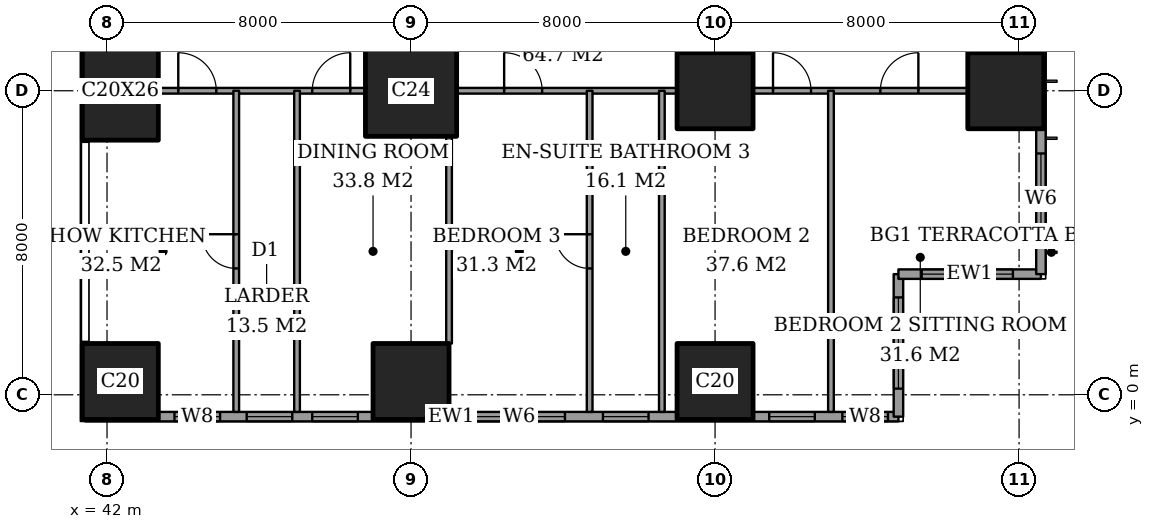
"""IFC4 building model, lengths in metres.
Left out: names, types, materials, properties, quantities, classifications, styles, units other than length and angle.
Written with IfcOpenShell. Run it as: python <this file> out.ifc"""

import sys

from ifc_helpers import new_model, si_unit, direction, frame, frame_2d, origin, origin_2d, place, context, subcontext, project, spatial, rectangle, extrude, element, fill, save


model = new_model("IFC4")
c1 = context("Model", 3, precision=1e-05, world=origin(), true_north=direction((0.0, 1.0)))
c2 = subcontext(c1, "Body", "Model", "MODEL_VIEW")
j1 = project(units=[si_unit("LENGTHUNIT", "METRE"), si_unit("PLANEANGLEUNIT", "RADIAN")], contexts=[c1])
p1 = place(None, origin())
s1 = spatial("IfcSite", under=j1, at=p1, CompositionType="ELEMENT")
p2 = place(p1, origin())
s2 = spatial("IfcBuilding", under=s1, at=p2, CompositionType="ELEMENT")
p3 = place(p2, frame((0.0, 0.0, 87.2)))
s3 = spatial("IfcBuildingStorey", under=s2, at=p3, CompositionType="ELEMENT", Elevation=87.2)
p4 = place(p3, frame((42.35, 0.35, 0.0), z_axis=(0.0, 0.0, 1.0), x_axis=(1.0, 0.0, 0.0)))
e1 = element("IfcColumn", 1, at=p4, inside=s3, PredefinedType="COLUMN", context=c2, shape_type="SweptSolid", body=[
    extrude(rectangle(XDim=2.0, YDim=2.0, at=origin_2d()), origin(), (0.0, 0.0, 1.0), 3.6),
])
p5 = place(p3, frame((42.35, 8.0, 0.0), z_axis=(0.0, 0.0, 1.0), x_axis=(1.0, 0.0, 0.0)))
e2 = element("IfcColumn", 2, at=p5, inside=s3, PredefinedType="COLUMN", context=c2, shape_type="SweptSolid", body=[
    extrude(rectangle(XDim=2.0, YDim=2.6, at=origin_2d()), origin(), (0.0, 0.0, 1.0), 3.6),
])
p6 = place(p3, frame((50.0, 0.35, 0.0), z_axis=(0.0, 0.0, 1.0), x_axis=(1.0, 0.0, 0.0)))
e3 = element("IfcColumn", 3, at=p6, inside=s3, PredefinedType="COLUMN", context=c2, shape_type="SweptSolid", body=[
    extrude(rectangle(XDim=2.0, YDim=2.0, at=origin_2d()), origin(), (0.0, 0.0, 1.0), 3.6),
])
p7 = place(p3, frame((50.0, 8.0, 0.0), z_axis=(0.0, 0.0, 1.0), x_axis=(1.0, 0.0, 0.0)))
e4 = element("IfcColumn", 4, at=p7, inside=s3, PredefinedType="COLUMN", context=c2, shape_type="SweptSolid", body=[
    extrude(rectangle(XDim=2.4, YDim=2.4, at=origin_2d()), origin(), (0.0, 0.0, 1.0), 3.6),
])
for number, where, z_axis, x_axis in (
    (5, (58.0, 0.35, 0.0), (0.0, 0.0, 1.0), (1.0, 0.0, 0.0)),
    (6, (58.0, 8.0, 0.0), (0.0, 0.0, 1.0), (1.0, 0.0, 0.0)),
    (7, (65.65, 8.0, 0.0), (0.0, 0.0, 1.0), (1.0, 0.0, 0.0)),
):
    element("IfcColumn", number, at=place(p3, frame(where, z_axis=z_axis, x_axis=x_axis)), inside=s3, PredefinedType="COLUMN", context=c2, shape_type="SweptSolid", body=[
        extrude(rectangle(XDim=2.0, YDim=2.0, at=origin_2d()), origin(), (0.0, 0.0, 1.0), 3.6),
    ])
p8 = place(p3, frame((41.425, -0.575, 0.0), z_axis=(0.0, 0.0, 1.0), x_axis=(1.0, 0.0, 0.0)))
e8 = element("IfcWall", 8, at=p8, inside=s3, PredefinedType="SOLIDWALL", context=c2, shape_type="SweptSolid", body=[
    extrude(rectangle(XDim=21.4, YDim=0.25, at=frame_2d((10.7, 0.0))), origin(), (0.0, 0.0, 1.0), 3.6),
])
p9 = place(p8, frame((2.35, 0.0, 0.6)))
e9 = element("IfcOpeningElement", 9, at=p9, cuts=e8, PredefinedType="OPENING", context=c2, shape_type="SweptSolid", body=[
    extrude(rectangle(XDim=1.2, YDim=2.0, at=frame_2d((0.6, 1.0))), frame((0.0, 0.135, 0.0), z_axis=(0.0, -1.0, 0.0), x_axis=(1.0, 0.0, 0.0)), (0.0, 0.0, 1.0), 0.27),
])
p10 = place(p8, frame((4.25, 0.0, 0.6)))
e10 = element("IfcOpeningElement", 10, at=p10, cuts=e8, PredefinedType="OPENING", context=c2, shape_type="SweptSolid", body=[
    extrude(rectangle(XDim=1.2, YDim=2.0, at=frame_2d((0.6, 1.0))), frame((0.0, 0.135, 0.0), z_axis=(0.0, -1.0, 0.0), x_axis=(1.0, 0.0, 0.0)), (0.0, 0.0, 1.0), 0.27),
])
p11 = place(p8, frame((5.975, 0.0, 0.6)))
e11 = element("IfcOpeningElement", 11, at=p11, cuts=e8, PredefinedType="OPENING", context=c2, shape_type="SweptSolid", body=[
    extrude(rectangle(XDim=1.2, YDim=2.0, at=frame_2d((0.6, 1.0))), frame((0.0, 0.135, 0.0), z_axis=(0.0, -1.0, 0.0), x_axis=(1.0, 0.0, 0.0)), (0.0, 0.0, 1.0), 0.27),
])
p12 = place(p8, frame((10.225, 0.0, 0.6)))
e12 = element("IfcOpeningElement", 12, at=p12, cuts=e8, PredefinedType="OPENING", context=c2, shape_type="SweptSolid", body=[
    extrude(rectangle(XDim=2.4, YDim=2.0, at=frame_2d((1.2, 1.0))), frame((0.0, 0.135, 0.0), z_axis=(0.0, -1.0, 0.0), x_axis=(1.0, 0.0, 0.0)), (0.0, 0.0, 1.0), 0.27),
])
p13 = place(p8, frame((13.625, 0.0, 0.6)))
e13 = element("IfcOpeningElement", 13, at=p13, cuts=e8, PredefinedType="OPENING", context=c2, shape_type="SweptSolid", body=[
    extrude(rectangle(XDim=1.2, YDim=2.0, at=frame_2d((0.6, 1.0))), frame((0.0, 0.135, 0.0), z_axis=(0.0, -1.0, 0.0), x_axis=(1.0, 0.0, 0.0)), (0.0, 0.0, 1.0), 0.27),
])
p14 = place(p8, frame((18.0, 0.0, 0.6)))
e14 = element("IfcOpeningElement", 14, at=p14, cuts=e8, PredefinedType="OPENING", context=c2, shape_type="SweptSolid", body=[
    extrude(rectangle(XDim=1.2, YDim=2.0, at=frame_2d((0.6, 1.0))), frame((0.0, 0.135, 0.0), z_axis=(0.0, -1.0, 0.0), x_axis=(1.0, 0.0, 0.0)), (0.0, 0.0, 1.0), 0.27),
])
p15 = place(p8, frame((19.925, 0.0, 0.6)))
e15 = element("IfcOpeningElement", 15, at=p15, cuts=e8, PredefinedType="OPENING", context=c2, shape_type="SweptSolid", body=[
    extrude(rectangle(XDim=1.2, YDim=2.0, at=frame_2d((0.6, 1.0))), frame((0.0, 0.135, 0.0), z_axis=(0.0, -1.0, 0.0), x_axis=(1.0, 0.0, 0.0)), (0.0, 0.0, 1.0), 0.27),
])
p16 = place(p3, frame((62.825, -0.575, 0.0), z_axis=(0.0, 0.0, 1.0), x_axis=(0.0, 1.0, 0.0)))
e16 = element("IfcWall", 16, at=p16, inside=s3, PredefinedType="SOLIDWALL", context=c2, shape_type="SweptSolid", body=[
    extrude(rectangle(XDim=3.75, YDim=0.25, at=frame_2d((1.875, 0.0))), origin(), (0.0, 0.0, 1.0), 3.6),
])
p17 = place(p16, frame((0.738, 0.0, 0.6)))
e17 = element("IfcOpeningElement", 17, at=p17, cuts=e16, PredefinedType="OPENING", context=c2, shape_type="SweptSolid", body=[
    extrude(rectangle(XDim=2.4, YDim=2.0, at=frame_2d((1.2, 1.0))), frame((0.0, 0.135, 0.0), z_axis=(0.0, -1.0, 0.0), x_axis=(1.0, 0.0, 0.0)), (0.0, 0.0, 1.0), 0.27),
])
p18 = place(p3, frame((62.825, 3.175, 0.0), z_axis=(0.0, 0.0, 1.0), x_axis=(1.0, 0.0, 0.0)))
e18 = element("IfcWall", 18, at=p18, inside=s3, PredefinedType="SOLIDWALL", context=c2, shape_type="SweptSolid", body=[
    extrude(rectangle(XDim=3.75, YDim=0.25, at=frame_2d((1.875, 0.0))), origin(), (0.0, 0.0, 1.0), 3.6),
])
p19 = place(p18, frame((0.613, 0.0, 0.6)))
e19 = element("IfcOpeningElement", 19, at=p19, cuts=e18, PredefinedType="OPENING", context=c2, shape_type="SweptSolid", body=[
    extrude(rectangle(XDim=2.4, YDim=2.0, at=frame_2d((1.2, 1.0))), frame((0.0, 0.135, 0.0), z_axis=(0.0, -1.0, 0.0), x_axis=(1.0, 0.0, 0.0)), (0.0, 0.0, 1.0), 0.27),
])
p20 = place(p3, frame((66.575, 3.175, 0.0), z_axis=(0.0, 0.0, 1.0), x_axis=(0.0, 1.0, 0.0)))
e20 = element("IfcWall", 20, at=p20, inside=s3, PredefinedType="SOLIDWALL", context=c2, shape_type="SweptSolid", body=[
    extrude(rectangle(XDim=41.65, YDim=0.25, at=frame_2d((20.825, 0.0))), origin(), (0.0, 0.0, 1.0), 3.6),
])
p21 = place(p20, frame((0.775, 0.0, 0.6)))
e21 = element("IfcOpeningElement", 21, at=p21, cuts=e20, PredefinedType="OPENING", context=c2, shape_type="SweptSolid", body=[
    extrude(rectangle(XDim=2.4, YDim=2.0, at=frame_2d((1.2, 1.0))), frame((0.0, 0.135, 0.0), z_axis=(0.0, -1.0, 0.0), x_axis=(1.0, 0.0, 0.0)), (0.0, 0.0, 1.0), 0.27),
])
p22 = place(p20, frame((6.1, 0.0, 0.6)))
e22 = element("IfcOpeningElement", 22, at=p22, cuts=e20, PredefinedType="OPENING", context=c2, shape_type="SweptSolid", body=[
    extrude(rectangle(XDim=1.2, YDim=2.0, at=frame_2d((0.6, 1.0))), frame((0.0, 0.135, 0.0), z_axis=(0.0, -1.0, 0.0), x_axis=(1.0, 0.0, 0.0)), (0.0, 0.0, 1.0), 0.27),
])
p23 = place(p20, frame((8.275, 0.0, 0.6)))
e23 = element("IfcOpeningElement", 23, at=p23, cuts=e20, PredefinedType="OPENING", context=c2, shape_type="SweptSolid", body=[
    extrude(rectangle(XDim=2.4, YDim=2.0, at=frame_2d((1.2, 1.0))), frame((0.0, 0.135, 0.0), z_axis=(0.0, -1.0, 0.0), x_axis=(1.0, 0.0, 0.0)), (0.0, 0.0, 1.0), 0.27),
])
p24 = place(p20, frame((15.775, 0.0, 0.6)))
e24 = element("IfcOpeningElement", 24, at=p24, cuts=e20, PredefinedType="OPENING", context=c2, shape_type="SweptSolid", body=[
    extrude(rectangle(XDim=2.4, YDim=2.0, at=frame_2d((1.2, 1.0))), frame((0.0, 0.135, 0.0), z_axis=(0.0, -1.0, 0.0), x_axis=(1.0, 0.0, 0.0)), (0.0, 0.0, 1.0), 0.27),
])
p25 = place(p20, frame((23.475, 0.0, 0.6)))
e25 = element("IfcOpeningElement", 25, at=p25, cuts=e20, PredefinedType="OPENING", context=c2, shape_type="SweptSolid", body=[
    extrude(rectangle(XDim=2.4, YDim=2.0, at=frame_2d((1.2, 1.0))), frame((0.0, 0.135, 0.0), z_axis=(0.0, -1.0, 0.0), x_axis=(1.0, 0.0, 0.0)), (0.0, 0.0, 1.0), 0.27),
])
p26 = place(p20, frame((30.975, 0.0, 0.6)))
e26 = element("IfcOpeningElement", 26, at=p26, cuts=e20, PredefinedType="OPENING", context=c2, shape_type="SweptSolid", body=[
    extrude(rectangle(XDim=2.4, YDim=2.0, at=frame_2d((1.2, 1.0))), frame((0.0, 0.135, 0.0), z_axis=(0.0, -1.0, 0.0), x_axis=(1.0, 0.0, 0.0)), (0.0, 0.0, 1.0), 0.27),
])
p27 = place(p20, frame((34.5, 0.0, 0.6)))
e27 = element("IfcOpeningElement", 27, at=p27, cuts=e20, PredefinedType="OPENING", context=c2, shape_type="SweptSolid", body=[
    extrude(rectangle(XDim=1.2, YDim=2.0, at=frame_2d((0.6, 1.0))), frame((0.0, 0.135, 0.0), z_axis=(0.0, -1.0, 0.0), x_axis=(1.0, 0.0, 0.0)), (0.0, 0.0, 1.0), 0.27),
])
p28 = place(p20, frame((38.475, 0.0, 0.6)))
e28 = element("IfcOpeningElement", 28, at=p28, cuts=e20, PredefinedType="OPENING", context=c2, shape_type="SweptSolid", body=[
    extrude(rectangle(XDim=2.4, YDim=2.0, at=frame_2d((1.2, 1.0))), frame((0.0, 0.135, 0.0), z_axis=(0.0, -1.0, 0.0), x_axis=(1.0, 0.0, 0.0)), (0.0, 0.0, 1.0), 0.27),
])
p29 = place(p3, frame((43.35, 8.0, 0.0), z_axis=(0.0, 0.0, 1.0), x_axis=(1.0, 0.0, 0.0)))
e29 = element("IfcWall", 29, at=p29, inside=s3, PredefinedType="PARTITIONING", context=c2, shape_type="SweptSolid", body=[
    extrude(rectangle(XDim=5.45, YDim=0.15, at=frame_2d((2.725, 0.0))), origin(), (0.0, 0.0, 1.0), 3.25),
])
p30 = place(p29, frame((4.05, 0.0, 0.0)))
e30 = element("IfcOpeningElement", 30, at=p30, cuts=e29, PredefinedType="OPENING", context=c2, shape_type="SweptSolid", body=[
    extrude(rectangle(XDim=1.0, YDim=2.1, at=frame_2d((0.5, 1.05))), frame((0.0, 0.085, 0.0), z_axis=(0.0, -1.0, 0.0), x_axis=(1.0, 0.0, 0.0)), (0.0, 0.0, 1.0), 0.17),
])
p31 = place(p29, frame((0.525, 0.0, 0.0)))
e31 = element("IfcOpeningElement", 31, at=p31, cuts=e29, PredefinedType="OPENING", context=c2, shape_type="SweptSolid", body=[
    extrude(rectangle(XDim=1.0, YDim=2.1, at=frame_2d((0.5, 1.05))), frame((0.0, 0.085, 0.0), z_axis=(0.0, -1.0, 0.0), x_axis=(1.0, 0.0, 0.0)), (0.0, 0.0, 1.0), 0.17),
])
p32 = place(p3, frame((51.2, 8.0, 0.0), z_axis=(0.0, 0.0, 1.0), x_axis=(1.0, 0.0, 0.0)))
e32 = element("IfcWall", 32, at=p32, inside=s3, PredefinedType="PARTITIONING", context=c2, shape_type="SweptSolid", body=[
    extrude(rectangle(XDim=5.8, YDim=0.15, at=frame_2d((2.9, 0.0))), origin(), (0.0, 0.0, 1.0), 3.25),
])
p33 = place(p32, frame((1.25, 0.0, 0.0)))
e33 = element("IfcOpeningElement", 33, at=p33, cuts=e32, PredefinedType="OPENING", context=c2, shape_type="SweptSolid", body=[
    extrude(rectangle(XDim=1.0, YDim=2.1, at=frame_2d((0.5, 1.05))), frame((0.0, 0.085, 0.0), z_axis=(0.0, -1.0, 0.0), x_axis=(1.0, 0.0, 0.0)), (0.0, 0.0, 1.0), 0.17),
])
p34 = place(p3, frame((59.0, 8.0, 0.0), z_axis=(0.0, 0.0, 1.0), x_axis=(1.0, 0.0, 0.0)))
e34 = element("IfcWall", 34, at=p34, inside=s3, PredefinedType="PARTITIONING", context=c2, shape_type="SweptSolid", body=[
    extrude(rectangle(XDim=5.65, YDim=0.15, at=frame_2d((2.825, 0.0))), origin(), (0.0, 0.0, 1.0), 3.25),
])
p35 = place(p34, frame((3.35, 0.0, 0.0)))
e35 = element("IfcOpeningElement", 35, at=p35, cuts=e34, PredefinedType="OPENING", context=c2, shape_type="SweptSolid", body=[
    extrude(rectangle(XDim=1.0, YDim=2.1, at=frame_2d((0.5, 1.05))), frame((0.0, 0.085, 0.0), z_axis=(0.0, -1.0, 0.0), x_axis=(1.0, 0.0, 0.0)), (0.0, 0.0, 1.0), 0.17),
])
p36 = place(p34, frame((0.525, 0.0, 0.0)))
e36 = element("IfcOpeningElement", 36, at=p36, cuts=e34, PredefinedType="OPENING", context=c2, shape_type="SweptSolid", body=[
    extrude(rectangle(XDim=1.0, YDim=2.1, at=frame_2d((0.5, 1.05))), frame((0.0, 0.085, 0.0), z_axis=(0.0, -1.0, 0.0), x_axis=(1.0, 0.0, 0.0)), (0.0, 0.0, 1.0), 0.17),
])
p37 = place(p3, frame((45.4, -0.45, 0.0), z_axis=(0.0, 0.0, 1.0), x_axis=(0.0, 1.0, 0.0)))
e37 = element("IfcWall", 37, at=p37, inside=s3, PredefinedType="PARTITIONING", context=c2, shape_type="SweptSolid", body=[
    extrude(rectangle(XDim=8.45, YDim=0.15, at=frame_2d((4.225, 0.0))), origin(), (0.0, 0.0, 1.0), 3.25),
])
p38 = place(p37, frame((3.775, 0.0, 0.0)))
e38 = element("IfcOpeningElement", 38, at=p38, cuts=e37, PredefinedType="OPENING", context=c2, shape_type="SweptSolid", body=[
    extrude(rectangle(XDim=0.9, YDim=2.1, at=frame_2d((0.45, 1.05))), frame((0.0, 0.085, 0.0), z_axis=(0.0, -1.0, 0.0), x_axis=(1.0, 0.0, 0.0)), (0.0, 0.0, 1.0), 0.17),
])
p39 = place(p3, frame((47.0, -0.45, 0.0), z_axis=(0.0, 0.0, 1.0), x_axis=(0.0, 1.0, 0.0)))
e39 = element("IfcWall", 39, at=p39, inside=s3, PredefinedType="PARTITIONING", context=c2, shape_type="SweptSolid", body=[
    extrude(rectangle(XDim=8.45, YDim=0.15, at=frame_2d((4.225, 0.0))), origin(), (0.0, 0.0, 1.0), 3.25),
])
p40 = place(p3, frame((51.0, 1.35, 0.0), z_axis=(0.0, 0.0, 1.0), x_axis=(0.0, 1.0, 0.0)))
e40 = element("IfcWall", 40, at=p40, inside=s3, PredefinedType="PARTITIONING", context=c2, shape_type="SweptSolid", body=[
    extrude(rectangle(XDim=5.45, YDim=0.15, at=frame_2d((2.725, 0.0))), origin(), (0.0, 0.0, 1.0), 3.25),
])
p41 = place(p3, frame((54.7, -0.45, 0.0), z_axis=(0.0, 0.0, 1.0), x_axis=(0.0, 1.0, 0.0)))
e41 = element("IfcWall", 41, at=p41, inside=s3, PredefinedType="PARTITIONING", context=c2, shape_type="SweptSolid", body=[
    extrude(rectangle(XDim=8.45, YDim=0.15, at=frame_2d((4.225, 0.0))), origin(), (0.0, 0.0, 1.0), 3.25),
])
p42 = place(p41, frame((3.775, 0.0, 0.0)))
e42 = element("IfcOpeningElement", 42, at=p42, cuts=e41, PredefinedType="OPENING", context=c2, shape_type="SweptSolid", body=[
    extrude(rectangle(XDim=0.9, YDim=2.1, at=frame_2d((0.45, 1.05))), frame((0.0, 0.085, 0.0), z_axis=(0.0, -1.0, 0.0), x_axis=(1.0, 0.0, 0.0)), (0.0, 0.0, 1.0), 0.17),
])
for number, where, z_axis, x_axis in (
    (43, (56.6, -0.45, 0.0), (0.0, 0.0, 1.0), (0.0, 1.0, 0.0)),
    (44, (61.05, -0.45, 0.0), (0.0, 0.0, 1.0), (0.0, 1.0, 0.0)),
):
    element("IfcWall", number, at=place(p3, frame(where, z_axis=z_axis, x_axis=x_axis)), inside=s3, PredefinedType="PARTITIONING", context=c2, shape_type="SweptSolid", body=[
        extrude(rectangle(XDim=8.45, YDim=0.15, at=frame_2d((4.225, 0.0))), origin(), (0.0, 0.0, 1.0), 3.25),
    ])
p43 = place(p9, origin())
e45 = element("IfcWindow", 45, at=p43, inside=s3, PartitioningType="SINGLE_PANEL", PredefinedType="WINDOW", context=c2, shape_type="SweptSolid", body=[
    extrude(rectangle(XDim=1.2, YDim=2.0, at=frame_2d((0.6, 1.0))), frame((0.0, 0.03, 0.0), z_axis=(0.0, -1.0, 0.0), x_axis=(1.0, 0.0, 0.0)), (0.0, 0.0, 1.0), 0.06),
])
fill(e9, e45)
p44 = place(p10, origin())
e46 = element("IfcWindow", 46, at=p44, inside=s3, PartitioningType="SINGLE_PANEL", PredefinedType="WINDOW", context=c2, shape_type="SweptSolid", body=[
    extrude(rectangle(XDim=1.2, YDim=2.0, at=frame_2d((0.6, 1.0))), frame((0.0, 0.03, 0.0), z_axis=(0.0, -1.0, 0.0), x_axis=(1.0, 0.0, 0.0)), (0.0, 0.0, 1.0), 0.06),
])
fill(e10, e46)
p45 = place(p11, origin())
e47 = element("IfcWindow", 47, at=p45, inside=s3, PartitioningType="SINGLE_PANEL", PredefinedType="WINDOW", context=c2, shape_type="SweptSolid", body=[
    extrude(rectangle(XDim=1.2, YDim=2.0, at=frame_2d((0.6, 1.0))), frame((0.0, 0.03, 0.0), z_axis=(0.0, -1.0, 0.0), x_axis=(1.0, 0.0, 0.0)), (0.0, 0.0, 1.0), 0.06),
])
fill(e11, e47)
p46 = place(p12, origin())
e48 = element("IfcWindow", 48, at=p46, inside=s3, PartitioningType="SINGLE_PANEL", PredefinedType="WINDOW", context=c2, shape_type="SweptSolid", body=[
    extrude(rectangle(XDim=2.4, YDim=2.0, at=frame_2d((1.2, 1.0))), frame((0.0, 0.03, 0.0), z_axis=(0.0, -1.0, 0.0), x_axis=(1.0, 0.0, 0.0)), (0.0, 0.0, 1.0), 0.06),
])
fill(e12, e48)
p47 = place(p13, origin())
e49 = element("IfcWindow", 49, at=p47, inside=s3, PartitioningType="SINGLE_PANEL", PredefinedType="WINDOW", context=c2, shape_type="SweptSolid", body=[
    extrude(rectangle(XDim=1.2, YDim=2.0, at=frame_2d((0.6, 1.0))), frame((0.0, 0.03, 0.0), z_axis=(0.0, -1.0, 0.0), x_axis=(1.0, 0.0, 0.0)), (0.0, 0.0, 1.0), 0.06),
])
fill(e13, e49)
p48 = place(p14, origin())
e50 = element("IfcWindow", 50, at=p48, inside=s3, PartitioningType="SINGLE_PANEL", PredefinedType="WINDOW", context=c2, shape_type="SweptSolid", body=[
    extrude(rectangle(XDim=1.2, YDim=2.0, at=frame_2d((0.6, 1.0))), frame((0.0, 0.03, 0.0), z_axis=(0.0, -1.0, 0.0), x_axis=(1.0, 0.0, 0.0)), (0.0, 0.0, 1.0), 0.06),
])
fill(e14, e50)
p49 = place(p15, origin())
e51 = element("IfcWindow", 51, at=p49, inside=s3, PartitioningType="SINGLE_PANEL", PredefinedType="WINDOW", context=c2, shape_type="SweptSolid", body=[
    extrude(rectangle(XDim=1.2, YDim=2.0, at=frame_2d((0.6, 1.0))), frame((0.0, 0.03, 0.0), z_axis=(0.0, -1.0, 0.0), x_axis=(1.0, 0.0, 0.0)), (0.0, 0.0, 1.0), 0.06),
])
fill(e15, e51)
p50 = place(p17, origin())
e52 = element("IfcWindow", 52, at=p50, inside=s3, PartitioningType="SINGLE_PANEL", PredefinedType="WINDOW", context=c2, shape_type="SweptSolid", body=[
    extrude(rectangle(XDim=2.4, YDim=2.0, at=frame_2d((1.2, 1.0))), frame((0.0, 0.03, 0.0), z_axis=(0.0, -1.0, 0.0), x_axis=(1.0, 0.0, 0.0)), (0.0, 0.0, 1.0), 0.06),
])
fill(e17, e52)
p51 = place(p19, origin())
e53 = element("IfcWindow", 53, at=p51, inside=s3, PartitioningType="SINGLE_PANEL", PredefinedType="WINDOW", context=c2, shape_type="SweptSolid", body=[
    extrude(rectangle(XDim=2.4, YDim=2.0, at=frame_2d((1.2, 1.0))), frame((0.0, 0.03, 0.0), z_axis=(0.0, -1.0, 0.0), x_axis=(1.0, 0.0, 0.0)), (0.0, 0.0, 1.0), 0.06),
])
fill(e19, e53)
p52 = place(p21, origin())
e54 = element("IfcWindow", 54, at=p52, inside=s3, PartitioningType="SINGLE_PANEL", PredefinedType="WINDOW", context=c2, shape_type="SweptSolid", body=[
    extrude(rectangle(XDim=2.4, YDim=2.0, at=frame_2d((1.2, 1.0))), frame((0.0, 0.03, 0.0), z_axis=(0.0, -1.0, 0.0), x_axis=(1.0, 0.0, 0.0)), (0.0, 0.0, 1.0), 0.06),
])
fill(e21, e54)
p53 = place(p35, origin())
e55 = element("IfcDoor", 55, at=p53, inside=s3, OperationType="SINGLE_SWING_LEFT", PredefinedType="DOOR", context=c2, shape_type="SweptSolid", body=[
    extrude(rectangle(XDim=1.0, YDim=2.1, at=frame_2d((0.5, 1.05))), frame((0.0, 0.025, 0.0), z_axis=(0.0, -1.0, 0.0), x_axis=(1.0, 0.0, 0.0)), (0.0, 0.0, 1.0), 0.05),
])
fill(e35, e55)
p54 = place(p36, origin())
e56 = element("IfcDoor", 56, at=p54, inside=s3, OperationType="SINGLE_SWING_RIGHT", PredefinedType="DOOR", context=c2, shape_type="SweptSolid", body=[
    extrude(rectangle(XDim=1.0, YDim=2.1, at=frame_2d((0.5, 1.05))), frame((0.0, 0.025, 0.0), z_axis=(0.0, -1.0, 0.0), x_axis=(1.0, 0.0, 0.0)), (0.0, 0.0, 1.0), 0.05),
])
fill(e36, e56)
p55 = place(p42, origin())
e57 = element("IfcDoor", 57, at=p55, inside=s3, OperationType="SINGLE_SWING_LEFT", PredefinedType="DOOR", context=c2, shape_type="SweptSolid", body=[
    extrude(rectangle(XDim=0.9, YDim=2.1, at=frame_2d((0.45, 1.05))), frame((0.0, 0.025, 0.0), z_axis=(0.0, -1.0, 0.0), x_axis=(1.0, 0.0, 0.0)), (0.0, 0.0, 1.0), 0.05),
])
fill(e42, e57)
p56 = place(p33, origin())
e58 = element("IfcDoor", 58, at=p56, inside=s3, OperationType="SINGLE_SWING_RIGHT", PredefinedType="DOOR", context=c2, shape_type="SweptSolid", body=[
    extrude(rectangle(XDim=1.0, YDim=2.1, at=frame_2d((0.5, 1.05))), frame((0.0, 0.025, 0.0), z_axis=(0.0, -1.0, 0.0), x_axis=(1.0, 0.0, 0.0)), (0.0, 0.0, 1.0), 0.05),
])
fill(e33, e58)
p57 = place(p30, origin())
e59 = element("IfcDoor", 59, at=p57, inside=s3, OperationType="SINGLE_SWING_LEFT", PredefinedType="DOOR", context=c2, shape_type="SweptSolid", body=[
    extrude(rectangle(XDim=1.0, YDim=2.1, at=frame_2d((0.5, 1.05))), frame((0.0, 0.025, 0.0), z_axis=(0.0, -1.0, 0.0), x_axis=(1.0, 0.0, 0.0)), (0.0, 0.0, 1.0), 0.05),
])
fill(e30, e59)
p58 = place(p38, origin())
e60 = element("IfcDoor", 60, at=p58, inside=s3, OperationType="SINGLE_SWING_LEFT", PredefinedType="DOOR", context=c2, shape_type="SweptSolid", body=[
    extrude(rectangle(XDim=0.9, YDim=2.1, at=frame_2d((0.45, 1.05))), frame((0.0, 0.025, 0.0), z_axis=(0.0, -1.0, 0.0), x_axis=(1.0, 0.0, 0.0)), (0.0, 0.0, 1.0), 0.05),
])
fill(e38, e60)
p59 = place(p31, origin())
e61 = element("IfcDoor", 61, at=p59, inside=s3, OperationType="SINGLE_SWING_RIGHT", PredefinedType="DOOR", context=c2, shape_type="SweptSolid", body=[
    extrude(rectangle(XDim=1.0, YDim=2.1, at=frame_2d((0.5, 1.05))), frame((0.0, 0.025, 0.0), z_axis=(0.0, -1.0, 0.0), x_axis=(1.0, 0.0, 0.0)), (0.0, 0.0, 1.0), 0.05),
])
fill(e31, e61)
save(model, sys.argv[1])
